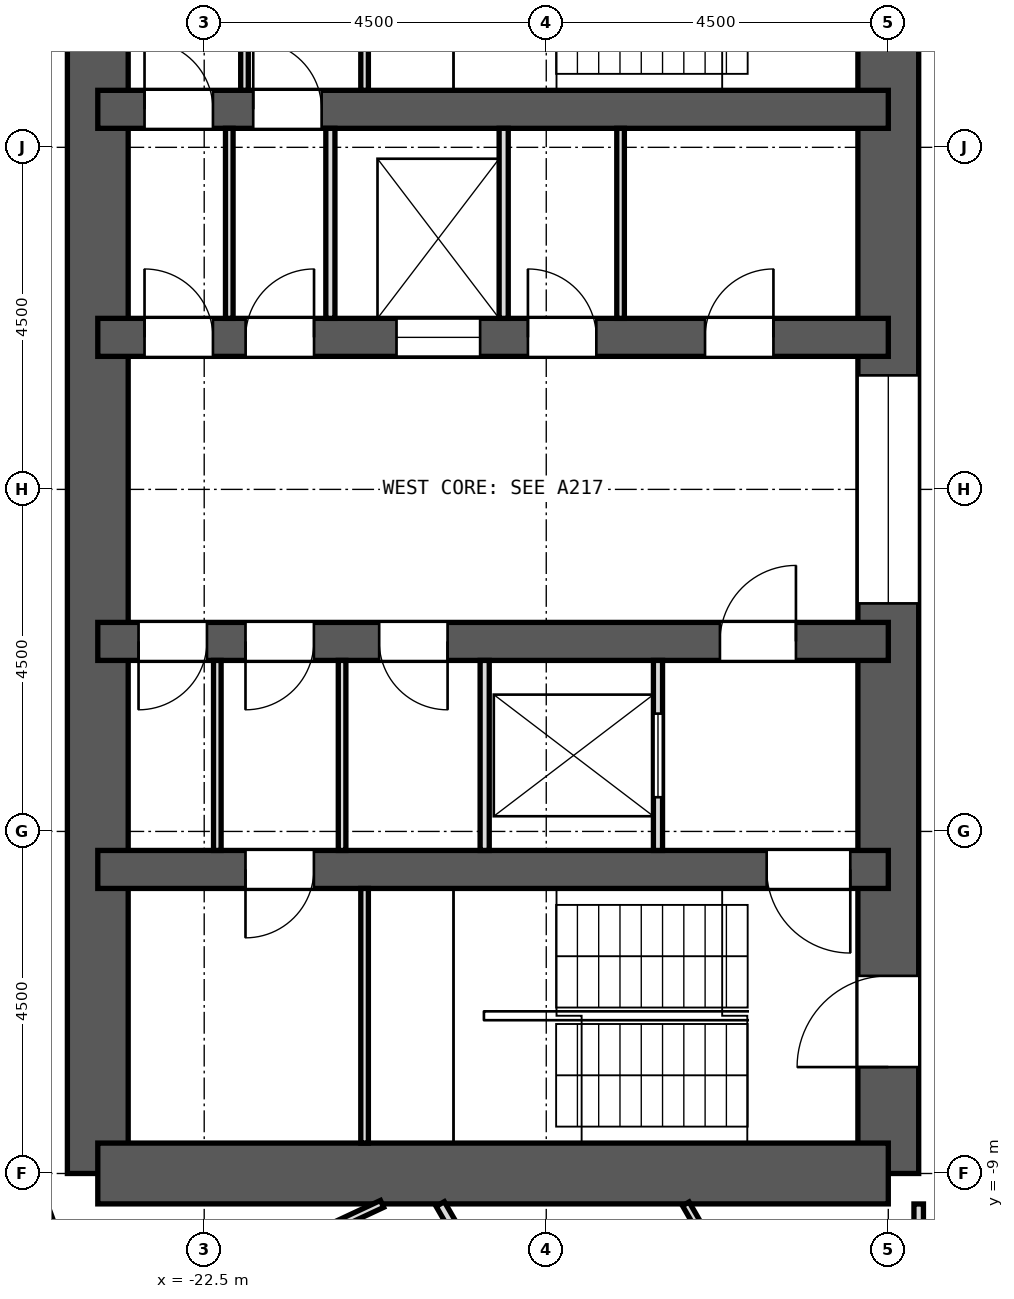
"""IFC4 building model, lengths in metres.
Left out: names, types, materials, properties, quantities, classifications, styles, units other than length and angle.
Written with IfcOpenShell. Run it as: python <this file> out.ifc"""

import sys

from ifc_helpers import new_model, si_unit, direction, frame, frame_2d, origin, place, context, subcontext, project, spatial, rectangle, extrude, element, fill, save


model = new_model("IFC4")
c1 = context("Model", 3, precision=1e-05, world=origin(), true_north=direction((0.0, 1.0)))
c2 = subcontext(c1, "Body", "Model", "MODEL_VIEW")
j1 = project(units=[si_unit("LENGTHUNIT", "METRE"), si_unit("PLANEANGLEUNIT", "RADIAN")], contexts=[c1])
p1 = place(None, origin())
s1 = spatial("IfcSite", under=j1, at=p1, CompositionType="ELEMENT")
p2 = place(p1, origin())
s2 = spatial("IfcBuilding", under=s1, at=p2, CompositionType="ELEMENT")
p3 = place(p2, frame((0.0, 0.0, 91.9)))
s3 = spatial("IfcBuildingStorey", under=s2, at=p3, CompositionType="ELEMENT", Elevation=91.9)
p4 = place(p3, frame((-13.5, -9.0, 0.0), z_axis=(0.0, 0.0, 1.0), x_axis=(0.0, 1.0, 0.0)))
e1 = element("IfcWall", 1, at=p4, inside=s3, PredefinedType="SHEAR", context=c2, shape_type="SweptSolid", body=[
    extrude(rectangle(XDim=18.0, YDim=0.8, at=frame_2d((9.0, 0.0))), origin(), (0.0, 0.0, 1.0), 3.3),
])
p5 = place(p4, frame((15.4, 0.0, 0.0)))
e2 = element("IfcOpeningElement", 2, at=p5, cuts=e1, PredefinedType="OPENING", context=c2, shape_type="SweptSolid", body=[
    extrude(rectangle(XDim=1.2, YDim=2.1, at=frame_2d((0.6, 1.05))), frame((0.0, 0.412, 0.0), z_axis=(0.0, -1.0, 0.0), x_axis=(1.0, 0.0, 0.0)), (0.0, 0.0, 1.0), 0.824),
])
p6 = place(p4, frame((1.4, 0.0, 0.0)))
e3 = element("IfcOpeningElement", 3, at=p6, cuts=e1, PredefinedType="OPENING", context=c2, shape_type="SweptSolid", body=[
    extrude(rectangle(XDim=1.2, YDim=2.1, at=frame_2d((0.6, 1.05))), frame((0.0, 0.412, 0.0), z_axis=(0.0, -1.0, 0.0), x_axis=(1.0, 0.0, 0.0)), (0.0, 0.0, 1.0), 0.824),
])
p7 = place(p4, frame((7.5, 0.0, 0.0)))
e4 = element("IfcOpeningElement", 4, at=p7, cuts=e1, PredefinedType="OPENING", context=c2, shape_type="SweptSolid", body=[
    extrude(rectangle(XDim=3.0, YDim=2.4, at=frame_2d((1.5, 1.2))), frame((0.0, 0.412, 0.0), z_axis=(0.0, -1.0, 0.0), x_axis=(1.0, 0.0, 0.0)), (0.0, 0.0, 1.0), 0.824),
])
p8 = place(p3, frame((-23.9, -9.0, 0.0), z_axis=(0.0, 0.0, 1.0), x_axis=(0.0, 1.0, 0.0)))
e5 = element("IfcWall", 5, at=p8, inside=s3, PredefinedType="SHEAR", context=c2, shape_type="SweptSolid", body=[
    extrude(rectangle(XDim=18.0, YDim=0.8, at=frame_2d((9.0, 0.0))), origin(), (0.0, 0.0, 1.0), 3.3),
])
p9 = place(p3, frame((-13.5, -9.0, 0.0), z_axis=(0.0, 0.0, 1.0), x_axis=(-1.0, 0.0, 0.0)))
e6 = element("IfcWall", 6, at=p9, inside=s3, PredefinedType="SHEAR", context=c2, shape_type="SweptSolid", body=[
    extrude(rectangle(XDim=10.4, YDim=0.8, at=frame_2d((5.2, 0.0))), origin(), (0.0, 0.0, 1.0), 3.3),
])
p10 = place(p3, frame((-13.5, 5.0, 0.0), z_axis=(0.0, 0.0, 1.0), x_axis=(-1.0, 0.0, 0.0)))
e7 = element("IfcWall", 7, at=p10, inside=s3, PredefinedType="SHEAR", context=c2, shape_type="SweptSolid", body=[
    extrude(rectangle(XDim=10.4, YDim=0.5, at=frame_2d((5.2, 0.0))), origin(), (0.0, 0.0, 1.0), 3.3),
])
p11 = place(p10, frame((7.455, 0.0, 0.0)))
e8 = element("IfcOpeningElement", 8, at=p11, cuts=e7, PredefinedType="OPENING", context=c2, shape_type="SweptSolid", body=[
    extrude(rectangle(XDim=0.9, YDim=2.1, at=frame_2d((0.45, 1.05))), frame((0.0, 0.262, 0.0), z_axis=(0.0, -1.0, 0.0), x_axis=(1.0, 0.0, 0.0)), (0.0, 0.0, 1.0), 0.524),
])
p12 = place(p10, frame((8.885, 0.0, 0.0)))
e9 = element("IfcOpeningElement", 9, at=p12, cuts=e7, PredefinedType="OPENING", context=c2, shape_type="SweptSolid", body=[
    extrude(rectangle(XDim=0.9, YDim=2.1, at=frame_2d((0.45, 1.05))), frame((0.0, 0.262, 0.0), z_axis=(0.0, -1.0, 0.0), x_axis=(1.0, 0.0, 0.0)), (0.0, 0.0, 1.0), 0.524),
])
p13 = place(p3, frame((-13.5, -5.0, 0.0), z_axis=(0.0, 0.0, 1.0), x_axis=(-1.0, 0.0, 0.0)))
e10 = element("IfcWall", 10, at=p13, inside=s3, PredefinedType="SHEAR", context=c2, shape_type="SweptSolid", body=[
    extrude(rectangle(XDim=10.4, YDim=0.5, at=frame_2d((5.2, 0.0))), origin(), (0.0, 0.0, 1.0), 3.3),
])
p14 = place(p13, frame((7.557, 0.0, 0.0)))
e11 = element("IfcOpeningElement", 11, at=p14, cuts=e10, PredefinedType="OPENING", context=c2, shape_type="SweptSolid", body=[
    extrude(rectangle(XDim=0.9, YDim=2.1, at=frame_2d((0.45, 1.05))), frame((0.0, 0.262, 0.0), z_axis=(0.0, -1.0, 0.0), x_axis=(1.0, 0.0, 0.0)), (0.0, 0.0, 1.0), 0.524),
])
p15 = place(p13, frame((0.5, 0.0, 0.0)))
e12 = element("IfcOpeningElement", 12, at=p15, cuts=e10, PredefinedType="OPENING", context=c2, shape_type="SweptSolid", body=[
    extrude(rectangle(XDim=1.1, YDim=2.1, at=frame_2d((0.55, 1.05))), frame((0.0, 0.262, 0.0), z_axis=(0.0, -1.0, 0.0), x_axis=(1.0, 0.0, 0.0)), (0.0, 0.0, 1.0), 0.524),
])
p16 = place(p3, frame((-13.5, 2.0, 0.0), z_axis=(0.0, 0.0, 1.0), x_axis=(-1.0, 0.0, 0.0)))
e13 = element("IfcWall", 13, at=p16, inside=s3, PredefinedType="SHEAR", context=c2, shape_type="SweptSolid", body=[
    extrude(rectangle(XDim=10.4, YDim=0.5, at=frame_2d((5.2, 0.0))), origin(), (0.0, 0.0, 1.0), 3.3),
])
p17 = place(p16, frame((5.37, 0.0, 0.0)))
e14 = element("IfcOpeningElement", 14, at=p17, cuts=e13, PredefinedType="OPENING", context=c2, shape_type="SweptSolid", body=[
    extrude(rectangle(XDim=1.1, YDim=2.1, at=frame_2d((0.55, 1.05))), frame((0.0, 0.262, 0.0), z_axis=(0.0, -1.0, 0.0), x_axis=(1.0, 0.0, 0.0)), (0.0, 0.0, 1.0), 0.524),
])
p18 = place(p16, frame((1.511, 0.0, 0.0)))
e15 = element("IfcOpeningElement", 15, at=p18, cuts=e13, PredefinedType="OPENING", context=c2, shape_type="SweptSolid", body=[
    extrude(rectangle(XDim=0.9, YDim=2.1, at=frame_2d((0.45, 1.05))), frame((0.0, 0.262, 0.0), z_axis=(0.0, -1.0, 0.0), x_axis=(1.0, 0.0, 0.0)), (0.0, 0.0, 1.0), 0.524),
])
p19 = place(p16, frame((3.841, 0.0, 0.0)))
e16 = element("IfcOpeningElement", 16, at=p19, cuts=e13, PredefinedType="OPENING", context=c2, shape_type="SweptSolid", body=[
    extrude(rectangle(XDim=0.9, YDim=2.1, at=frame_2d((0.45, 1.05))), frame((0.0, 0.262, 0.0), z_axis=(0.0, -1.0, 0.0), x_axis=(1.0, 0.0, 0.0)), (0.0, 0.0, 1.0), 0.524),
])
p20 = place(p16, frame((7.555, 0.0, 0.0)))
e17 = element("IfcOpeningElement", 17, at=p20, cuts=e13, PredefinedType="OPENING", context=c2, shape_type="SweptSolid", body=[
    extrude(rectangle(XDim=0.9, YDim=2.1, at=frame_2d((0.45, 1.05))), frame((0.0, 0.262, 0.0), z_axis=(0.0, -1.0, 0.0), x_axis=(1.0, 0.0, 0.0)), (0.0, 0.0, 1.0), 0.524),
])
p21 = place(p16, frame((8.885, 0.0, 0.0)))
e18 = element("IfcOpeningElement", 18, at=p21, cuts=e13, PredefinedType="OPENING", context=c2, shape_type="SweptSolid", body=[
    extrude(rectangle(XDim=0.9, YDim=2.1, at=frame_2d((0.45, 1.05))), frame((0.0, 0.262, 0.0), z_axis=(0.0, -1.0, 0.0), x_axis=(1.0, 0.0, 0.0)), (0.0, 0.0, 1.0), 0.524),
])
p22 = place(p3, frame((-13.5, -2.0, 0.0), z_axis=(0.0, 0.0, 1.0), x_axis=(-1.0, 0.0, 0.0)))
e19 = element("IfcWall", 19, at=p22, inside=s3, PredefinedType="SHEAR", context=c2, shape_type="SweptSolid", body=[
    extrude(rectangle(XDim=10.4, YDim=0.5, at=frame_2d((5.2, 0.0))), origin(), (0.0, 0.0, 1.0), 3.3),
])
p23 = place(p22, frame((1.215, 0.0, 0.0)))
e20 = element("IfcOpeningElement", 20, at=p23, cuts=e19, PredefinedType="OPENING", context=c2, shape_type="SweptSolid", body=[
    extrude(rectangle(XDim=1.0, YDim=2.1, at=frame_2d((0.5, 1.05))), frame((0.0, 0.262, 0.0), z_axis=(0.0, -1.0, 0.0), x_axis=(1.0, 0.0, 0.0)), (0.0, 0.0, 1.0), 0.524),
])
p24 = place(p22, frame((5.798, 0.0, 0.0)))
e21 = element("IfcOpeningElement", 21, at=p24, cuts=e19, PredefinedType="OPENING", context=c2, shape_type="SweptSolid", body=[
    extrude(rectangle(XDim=0.9, YDim=2.1, at=frame_2d((0.45, 1.05))), frame((0.0, 0.262, 0.0), z_axis=(0.0, -1.0, 0.0), x_axis=(1.0, 0.0, 0.0)), (0.0, 0.0, 1.0), 0.524),
])
p25 = place(p22, frame((7.557, 0.0, 0.0)))
e22 = element("IfcOpeningElement", 22, at=p25, cuts=e19, PredefinedType="OPENING", context=c2, shape_type="SweptSolid", body=[
    extrude(rectangle(XDim=0.9, YDim=2.1, at=frame_2d((0.45, 1.05))), frame((0.0, 0.262, 0.0), z_axis=(0.0, -1.0, 0.0), x_axis=(1.0, 0.0, 0.0)), (0.0, 0.0, 1.0), 0.524),
])
p26 = place(p22, frame((8.964, 0.0, 0.0)))
e23 = element("IfcOpeningElement", 23, at=p26, cuts=e19, PredefinedType="OPENING", context=c2, shape_type="SweptSolid", body=[
    extrude(rectangle(XDim=0.9, YDim=2.1, at=frame_2d((0.45, 1.05))), frame((0.0, 0.262, 0.0), z_axis=(0.0, -1.0, 0.0), x_axis=(1.0, 0.0, 0.0)), (0.0, 0.0, 1.0), 0.524),
])
p27 = place(p3, frame((-25.617, -7.383, 0.0), z_axis=(0.0, 0.0, 1.0), x_axis=(0.341990236633, -0.939703505393, 0.0)))
e24 = element("IfcWall", 24, at=p27, inside=s3, PredefinedType="SOLIDWALL", context=c2, shape_type="SweptSolid", body=[
    extrude(rectangle(XDim=3.648, YDim=0.6, at=frame_2d((1.824, 0.0))), origin(), (0.0, 0.0, 1.0), 2.8),
])
p28 = place(p3, frame((-19.395, -9.402, 0.0), z_axis=(0.0, 0.0, 1.0), x_axis=(0.499726480438, -0.866183262797, 0.0)))
e25 = element("IfcWall", 25, at=p28, inside=s3, PredefinedType="PARTITIONING", context=c2, shape_type="SweptSolid", body=[
    extrude(rectangle(XDim=3.499, YDim=0.125, at=frame_2d((1.75, 0.0))), origin(), (0.0, 0.0, 1.0), 2.8),
])
p29 = place(p28, frame((1.581, 0.0, 0.0)))
e26 = element("IfcOpeningElement", 26, at=p29, cuts=e25, PredefinedType="OPENING", context=c2, shape_type="SweptSolid", body=[
    extrude(rectangle(XDim=0.9, YDim=2.1, at=frame_2d((0.45, 1.05))), frame((0.0, 0.074, 0.0), z_axis=(0.0, -1.0, 0.0), x_axis=(1.0, 0.0, 0.0)), (0.0, 0.0, 1.0), 0.149),
])
p30 = place(p3, frame((-16.164, -9.4, 0.0), z_axis=(0.0, 0.0, 1.0), x_axis=(0.499687832671, -0.866205558676, 0.0)))
e27 = element("IfcWall", 27, at=p30, inside=s3, PredefinedType="PARTITIONING", context=c2, shape_type="SweptSolid", body=[
    extrude(rectangle(XDim=1.628, YDim=0.1, at=frame_2d((0.814, 0.0))), origin(), (0.0, 0.0, 1.0), 2.8),
])
p31 = place(p3, frame((-23.26, -10.847, 0.0), z_axis=(0.0, 0.0, 1.0), x_axis=(0.906121146584, 0.423018282954, 0.0)))
e28 = element("IfcWall", 28, at=p31, inside=s3, PredefinedType="PARTITIONING", context=c2, shape_type="SweptSolid", body=[
    extrude(rectangle(XDim=3.421, YDim=0.1, at=frame_2d((1.711, 0.0))), origin(), (0.0, 0.0, 1.0), 2.8),
])
p32 = place(p3, frame((-13.057, -13.049, 0.0), z_axis=(0.0, 0.0, 1.0), x_axis=(0.708367099834, 0.705844212183, 0.0)))
e29 = element("IfcWall", 29, at=p32, inside=s3, PredefinedType="PARTITIONING", context=c2, shape_type="SweptSolid", body=[
    extrude(rectangle(XDim=7.354, YDim=0.125, at=frame_2d((3.677, 0.0))), origin(), (0.0, 0.0, 1.0), 2.8),
])
p33 = place(p3, frame((-13.1, -13.032, 0.0), z_axis=(0.0, 0.0, 1.0), x_axis=(0.0, 1.0, 0.0)))
e30 = element("IfcWall", 30, at=p33, inside=s3, PredefinedType="PARTITIONING", context=c2, shape_type="SweptSolid", body=[
    extrude(rectangle(XDim=3.632, YDim=0.125, at=frame_2d((1.816, 0.0))), origin(), (0.0, 0.0, 1.0), 2.8),
])
p34 = place(p3, frame((-17.022, 2.25, 0.0), z_axis=(0.0, 0.0, 1.0), x_axis=(0.0, 1.0, 0.0)))
e31 = element("IfcWall", 31, at=p34, inside=s3, PredefinedType="PARTITIONING", context=c2, shape_type="SweptSolid", body=[
    extrude(rectangle(XDim=2.5, YDim=0.1, at=frame_2d((1.25, 0.0))), origin(), (0.0, 0.0, 1.0), 2.8),
])
for number, where, z_axis, x_axis in (
    (32, (-18.56, 2.25, 0.0), (0.0, 0.0, 1.0), (0.0, 1.0, 0.0)),
    (33, (-20.84, 2.25, 0.0), (0.0, 0.0, 1.0), (0.0, 1.0, 0.0)),
):
    element("IfcWall", number, at=place(p3, frame(where, z_axis=z_axis, x_axis=x_axis)), inside=s3, PredefinedType="PARTITIONING", context=c2, shape_type="SweptSolid", body=[
        extrude(rectangle(XDim=2.5, YDim=0.12, at=frame_2d((1.25, 0.0))), origin(), (0.0, 0.0, 1.0), 2.8),
    ])
p35 = place(p3, frame((-22.17, 2.25, 0.0), z_axis=(0.0, 0.0, 1.0), x_axis=(0.0, 1.0, 0.0)))
e34 = element("IfcWall", 34, at=p35, inside=s3, PredefinedType="PARTITIONING", context=c2, shape_type="SweptSolid", body=[
    extrude(rectangle(XDim=2.5, YDim=0.1, at=frame_2d((1.25, 0.0))), origin(), (0.0, 0.0, 1.0), 2.8),
])
p36 = place(p3, frame((-16.53, -4.75, 0.0), z_axis=(0.0, 0.0, 1.0), x_axis=(0.0, 1.0, 0.0)))
e35 = element("IfcWall", 35, at=p36, inside=s3, PredefinedType="PARTITIONING", context=c2, shape_type="SweptSolid", body=[
    extrude(rectangle(XDim=2.5, YDim=0.12, at=frame_2d((1.25, 0.0))), origin(), (0.0, 0.0, 1.0), 2.8),
])
p37 = place(p36, frame((0.7, 0.0, 0.0)))
e36 = element("IfcOpeningElement", 36, at=p37, cuts=e35, PredefinedType="OPENING", context=c2, shape_type="SweptSolid", body=[
    extrude(rectangle(XDim=1.1, YDim=2.1, at=frame_2d((0.55, 1.05))), frame((0.0, 0.072, 0.0), z_axis=(0.0, -1.0, 0.0), x_axis=(1.0, 0.0, 0.0)), (0.0, 0.0, 1.0), 0.144),
])
p38 = place(p3, frame((-18.81, -4.75, 0.0), z_axis=(0.0, 0.0, 1.0), x_axis=(0.0, 1.0, 0.0)))
e37 = element("IfcWall", 37, at=p38, inside=s3, PredefinedType="PARTITIONING", context=c2, shape_type="SweptSolid", body=[
    extrude(rectangle(XDim=2.5, YDim=0.12, at=frame_2d((1.25, 0.0))), origin(), (0.0, 0.0, 1.0), 2.8),
])
for number, where, z_axis, x_axis in (
    (38, (-20.686, -4.75, 0.0), (0.0, 0.0, 1.0), (0.0, 1.0, 0.0)),
    (39, (-22.327, -4.75, 0.0), (0.0, 0.0, 1.0), (0.0, 1.0, 0.0)),
):
    element("IfcWall", number, at=place(p3, frame(where, z_axis=z_axis, x_axis=x_axis)), inside=s3, PredefinedType="PARTITIONING", context=c2, shape_type="SweptSolid", body=[
        extrude(rectangle(XDim=2.5, YDim=0.1, at=frame_2d((1.25, 0.0))), origin(), (0.0, 0.0, 1.0), 2.8),
    ])
for number, where, z_axis, x_axis in (
    (40, (-20.39, 5.25, 0.0), (0.0, 0.0, 1.0), (0.0, 1.0, 0.0)),
    (41, (-21.97, 5.25, 0.0), (0.0, 0.0, 1.0), (0.0, 1.0, 0.0)),
    (42, (-20.39, -8.6, 0.0), (0.0, 0.0, 1.0), (0.0, 1.0, 0.0)),
):
    element("IfcWall", number, at=place(p3, frame(where, z_axis=z_axis, x_axis=x_axis)), inside=s3, PredefinedType="PARTITIONING", context=c2, shape_type="SweptSolid", body=[
        extrude(rectangle(XDim=3.35, YDim=0.1, at=frame_2d((1.675, 0.0))), origin(), (0.0, 0.0, 1.0), 2.8),
    ])
p39 = place(p17, origin())
e43 = element("IfcDoor", 43, at=p39, inside=s3, OperationType="DOUBLE_DOOR_SLIDING", PredefinedType="DOOR", context=c2, shape_type="SweptSolid", body=[
    extrude(rectangle(XDim=1.1, YDim=2.1, at=frame_2d((0.55, 1.05))), frame((0.0, 0.025, 0.0), z_axis=(0.0, -1.0, 0.0), x_axis=(1.0, 0.0, 0.0)), (0.0, 0.0, 1.0), 0.05),
])
fill(e14, e43)
p40 = place(p37, origin())
e44 = element("IfcDoor", 44, at=p40, inside=s3, OperationType="DOUBLE_DOOR_SLIDING", PredefinedType="DOOR", context=c2, shape_type="SweptSolid", body=[
    extrude(rectangle(XDim=1.1, YDim=2.1, at=frame_2d((0.55, 1.05))), frame((0.0, 0.025, 0.0), z_axis=(0.0, -1.0, 0.0), x_axis=(1.0, 0.0, 0.0)), (0.0, 0.0, 1.0), 0.05),
])
fill(e36, e44)
p41 = place(p18, frame((0.9, 0.0, 0.0), z_axis=(0.0, 0.0, 1.0), x_axis=(-1.0, 0.0, 0.0)))
e45 = element("IfcDoor", 45, at=p41, inside=s3, OperationType="SINGLE_SWING_RIGHT", PredefinedType="DOOR", context=c2, shape_type="SweptSolid", body=[
    extrude(rectangle(XDim=0.9, YDim=2.1, at=frame_2d((0.45, 1.05))), frame((0.0, 0.025, 0.0), z_axis=(0.0, -1.0, 0.0), x_axis=(1.0, 0.0, 0.0)), (0.0, 0.0, 1.0), 0.05),
])
fill(e15, e45)
p42 = place(p19, frame((0.9, 0.0, 0.0), z_axis=(0.0, 0.0, 1.0), x_axis=(-1.0, 0.0, 0.0)))
e46 = element("IfcDoor", 46, at=p42, inside=s3, OperationType="SINGLE_SWING_LEFT", PredefinedType="DOOR", context=c2, shape_type="SweptSolid", body=[
    extrude(rectangle(XDim=0.9, YDim=2.1, at=frame_2d((0.45, 1.05))), frame((0.0, 0.025, 0.0), z_axis=(0.0, -1.0, 0.0), x_axis=(1.0, 0.0, 0.0)), (0.0, 0.0, 1.0), 0.05),
])
fill(e16, e46)
p43 = place(p20, frame((0.9, 0.0, 0.0), z_axis=(0.0, 0.0, 1.0), x_axis=(-1.0, 0.0, 0.0)))
e47 = element("IfcDoor", 47, at=p43, inside=s3, OperationType="SINGLE_SWING_RIGHT", PredefinedType="DOOR", context=c2, shape_type="SweptSolid", body=[
    extrude(rectangle(XDim=0.9, YDim=2.1, at=frame_2d((0.45, 1.05))), frame((0.0, 0.025, 0.0), z_axis=(0.0, -1.0, 0.0), x_axis=(1.0, 0.0, 0.0)), (0.0, 0.0, 1.0), 0.05),
])
fill(e17, e47)
p44 = place(p21, frame((0.9, 0.0, 0.0), z_axis=(0.0, 0.0, 1.0), x_axis=(-1.0, 0.0, 0.0)))
e48 = element("IfcDoor", 48, at=p44, inside=s3, OperationType="SINGLE_SWING_LEFT", PredefinedType="DOOR", context=c2, shape_type="SweptSolid", body=[
    extrude(rectangle(XDim=0.9, YDim=2.1, at=frame_2d((0.45, 1.05))), frame((0.0, 0.025, 0.0), z_axis=(0.0, -1.0, 0.0), x_axis=(1.0, 0.0, 0.0)), (0.0, 0.0, 1.0), 0.05),
])
fill(e18, e48)
p45 = place(p23, frame((1.0, 0.0, 0.0), z_axis=(0.0, 0.0, 1.0), x_axis=(-1.0, 0.0, 0.0)))
e49 = element("IfcDoor", 49, at=p45, inside=s3, OperationType="SINGLE_SWING_RIGHT", PredefinedType="DOOR", context=c2, shape_type="SweptSolid", body=[
    extrude(rectangle(XDim=1.0, YDim=2.1, at=frame_2d((0.5, 1.05))), frame((0.0, 0.025, 0.0), z_axis=(0.0, -1.0, 0.0), x_axis=(1.0, 0.0, 0.0)), (0.0, 0.0, 1.0), 0.05),
])
fill(e20, e49)
p46 = place(p24, origin())
e50 = element("IfcDoor", 50, at=p46, inside=s3, OperationType="SINGLE_SWING_LEFT", PredefinedType="DOOR", context=c2, shape_type="SweptSolid", body=[
    extrude(rectangle(XDim=0.9, YDim=2.1, at=frame_2d((0.45, 1.05))), frame((0.0, 0.025, 0.0), z_axis=(0.0, -1.0, 0.0), x_axis=(1.0, 0.0, 0.0)), (0.0, 0.0, 1.0), 0.05),
])
fill(e21, e50)
p47 = place(p25, origin())
e51 = element("IfcDoor", 51, at=p47, inside=s3, OperationType="SINGLE_SWING_RIGHT", PredefinedType="DOOR", context=c2, shape_type="SweptSolid", body=[
    extrude(rectangle(XDim=0.9, YDim=2.1, at=frame_2d((0.45, 1.05))), frame((0.0, 0.025, 0.0), z_axis=(0.0, -1.0, 0.0), x_axis=(1.0, 0.0, 0.0)), (0.0, 0.0, 1.0), 0.05),
])
fill(e22, e51)
p48 = place(p26, origin())
e52 = element("IfcDoor", 52, at=p48, inside=s3, OperationType="SINGLE_SWING_RIGHT", PredefinedType="DOOR", context=c2, shape_type="SweptSolid", body=[
    extrude(rectangle(XDim=0.9, YDim=2.1, at=frame_2d((0.45, 1.05))), frame((0.0, 0.025, 0.0), z_axis=(0.0, -1.0, 0.0), x_axis=(1.0, 0.0, 0.0)), (0.0, 0.0, 1.0), 0.05),
])
fill(e23, e52)
p49 = place(p11, frame((0.9, 0.0, 0.0), z_axis=(0.0, 0.0, 1.0), x_axis=(-1.0, 0.0, 0.0)))
e53 = element("IfcDoor", 53, at=p49, inside=s3, OperationType="SINGLE_SWING_LEFT", PredefinedType="DOOR", context=c2, shape_type="SweptSolid", body=[
    extrude(rectangle(XDim=0.9, YDim=2.1, at=frame_2d((0.45, 1.05))), frame((0.0, 0.025, 0.0), z_axis=(0.0, -1.0, 0.0), x_axis=(1.0, 0.0, 0.0)), (0.0, 0.0, 1.0), 0.05),
])
fill(e8, e53)
p50 = place(p12, frame((0.9, 0.0, 0.0), z_axis=(0.0, 0.0, 1.0), x_axis=(-1.0, 0.0, 0.0)))
e54 = element("IfcDoor", 54, at=p50, inside=s3, OperationType="SINGLE_SWING_LEFT", PredefinedType="DOOR", context=c2, shape_type="SweptSolid", body=[
    extrude(rectangle(XDim=0.9, YDim=2.1, at=frame_2d((0.45, 1.05))), frame((0.0, 0.025, 0.0), z_axis=(0.0, -1.0, 0.0), x_axis=(1.0, 0.0, 0.0)), (0.0, 0.0, 1.0), 0.05),
])
fill(e9, e54)
p51 = place(p14, origin())
e55 = element("IfcDoor", 55, at=p51, inside=s3, OperationType="SINGLE_SWING_RIGHT", PredefinedType="DOOR", context=c2, shape_type="SweptSolid", body=[
    extrude(rectangle(XDim=0.9, YDim=2.1, at=frame_2d((0.45, 1.05))), frame((0.0, 0.025, 0.0), z_axis=(0.0, -1.0, 0.0), x_axis=(1.0, 0.0, 0.0)), (0.0, 0.0, 1.0), 0.05),
])
fill(e11, e55)
p52 = place(p15, origin())
e56 = element("IfcDoor", 56, at=p52, inside=s3, OperationType="SINGLE_SWING_LEFT", PredefinedType="DOOR", context=c2, shape_type="SweptSolid", body=[
    extrude(rectangle(XDim=1.1, YDim=2.1, at=frame_2d((0.55, 1.05))), frame((0.0, 0.025, 0.0), z_axis=(0.0, -1.0, 0.0), x_axis=(1.0, 0.0, 0.0)), (0.0, 0.0, 1.0), 0.05),
])
fill(e12, e56)
p53 = place(p6, origin())
e57 = element("IfcDoor", 57, at=p53, inside=s3, OperationType="SINGLE_SWING_LEFT", PredefinedType="DOOR", context=c2, shape_type="SweptSolid", body=[
    extrude(rectangle(XDim=1.2, YDim=2.1, at=frame_2d((0.6, 1.05))), frame((0.0, 0.025, 0.0), z_axis=(0.0, -1.0, 0.0), x_axis=(1.0, 0.0, 0.0)), (0.0, 0.0, 1.0), 0.05),
])
fill(e3, e57)
p54 = place(p7, origin())
e58 = element("IfcDoor", 58, at=p54, inside=s3, OperationType="DOUBLE_DOOR_SLIDING", PredefinedType="DOOR", context=c2, shape_type="SweptSolid", body=[
    extrude(rectangle(XDim=3.0, YDim=2.4, at=frame_2d((1.5, 1.2))), frame((0.0, 0.025, 0.0), z_axis=(0.0, -1.0, 0.0), x_axis=(1.0, 0.0, 0.0)), (0.0, 0.0, 1.0), 0.05),
])
fill(e4, e58)
save(model, sys.argv[1])
